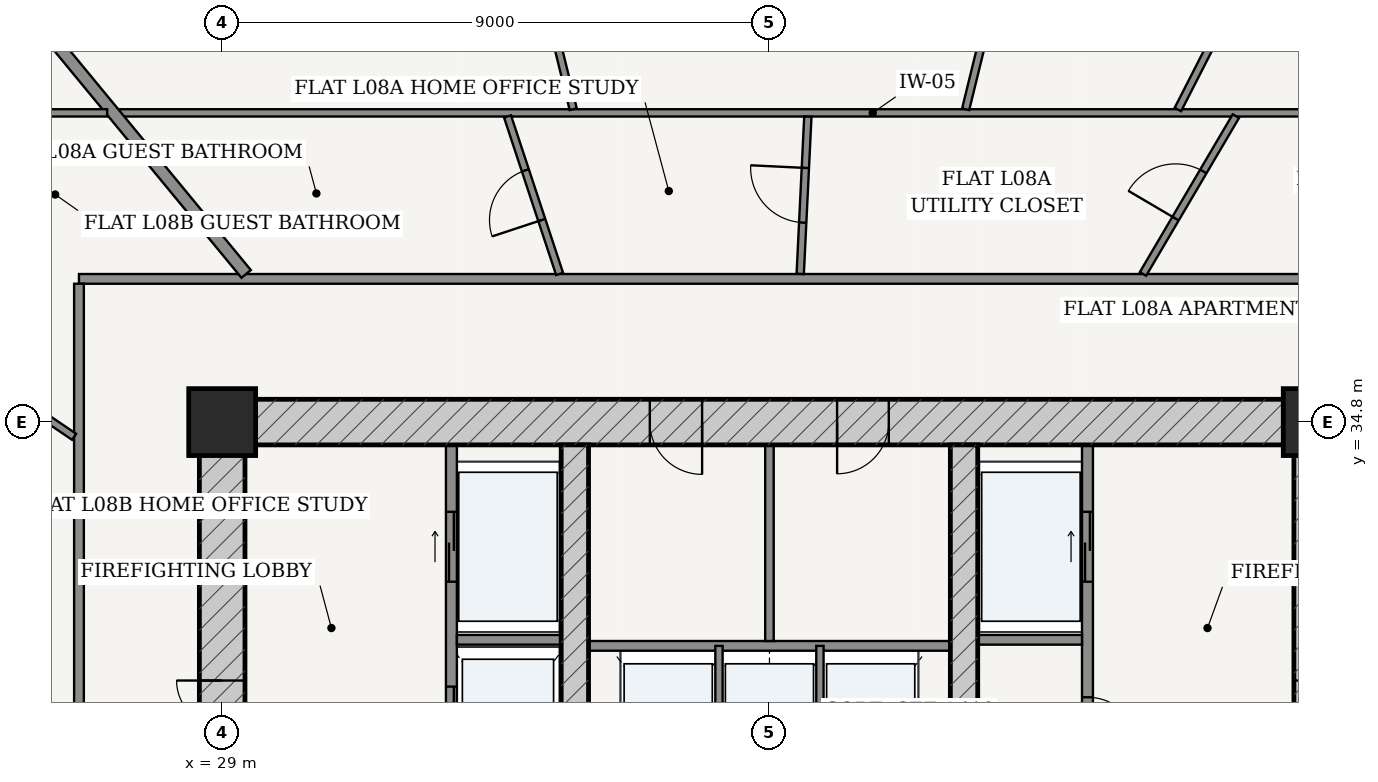
"""IFC4 building model, lengths in metres.
Left out: names, types, materials, properties, quantities, classifications, styles, units other than length and angle.
Written with IfcOpenShell. Run it as: python <this file> out.ifc"""

import sys

from ifc_helpers import new_model, si_unit, direction, frame, frame_2d, origin, origin_2d, place, context, subcontext, project, spatial, rectangle, extrude, source, transform, mapped, element, fill, save


model = new_model("IFC4")
c1 = context("Model", 3, precision=1e-05, world=origin(), true_north=direction((-0.2419218956, 0.970295726276)))
c2 = subcontext(c1, "Body", "Model", "MODEL_VIEW")
j1 = project(units=[si_unit("LENGTHUNIT", "METRE"), si_unit("PLANEANGLEUNIT", "RADIAN")], contexts=[c1])
p1 = place(None, origin())
s1 = spatial("IfcSite", under=j1, at=p1, CompositionType="ELEMENT")
p2 = place(p1, origin())
s2 = spatial("IfcBuilding", under=s1, at=p2, CompositionType="ELEMENT")
p3 = place(p2, frame((0.0, 0.0, 34.8)))
s3 = spatial("IfcBuildingStorey", under=s2, at=p3, CompositionType="ELEMENT", Elevation=34.8)
for number, where, z_axis, x_axis in (
    (1, (47.0, 34.8, 0.0), (0.0, 0.0, 1.0), (1.0, 0.0, 0.0)),
    (2, (29.0, 34.8, 0.0), (0.0, 0.0, 1.0), (1.0, 0.0, 0.0)),
):
    element("IfcColumn", number, at=place(p3, frame(where, z_axis=z_axis, x_axis=x_axis)), inside=s3, PredefinedType="COLUMN", context=c2, shape_type="SweptSolid", body=[
        extrude(rectangle(XDim=1.1, YDim=1.1, at=origin_2d()), origin(), (0.0, 0.0, 1.0), 3.6),
    ])
p4 = place(p3, frame((28.625, 34.8, 0.0), z_axis=(0.0, 0.0, 1.0), x_axis=(1.0, 0.0, 0.0)))
e3 = element("IfcWall", 3, at=p4, inside=s3, PredefinedType="SHEAR", context=c2, shape_type="SweptSolid", body=[
    extrude(rectangle(XDim=18.75, YDim=0.75, at=frame_2d((9.375, 0.0))), origin(), (0.0, 0.0, 1.0), 3.32),
])
p5 = place(p4, frame((7.407, 0.0, 0.0)))
e4 = element("IfcOpeningElement", 4, at=p5, cuts=e3, PredefinedType="OPENING", context=c2, shape_type="SweptSolid", body=[
    extrude(rectangle(XDim=0.86, YDim=2.1, at=frame_2d((0.43, 1.05))), frame((0.0, 0.385, 0.0), z_axis=(0.0, -1.0, 0.0), x_axis=(1.0, 0.0, 0.0)), (0.0, 0.0, 1.0), 0.77),
])
p6 = place(p4, frame((10.488, 0.0, 0.0)))
e5 = element("IfcOpeningElement", 5, at=p6, cuts=e3, PredefinedType="OPENING", context=c2, shape_type="SweptSolid", body=[
    extrude(rectangle(XDim=0.85, YDim=2.1, at=frame_2d((0.425, 1.05))), frame((0.0, 0.385, 0.0), z_axis=(0.0, -1.0, 0.0), x_axis=(1.0, 0.0, 0.0)), (0.0, 0.0, 1.0), 0.77),
])
p7 = place(p3, frame((29.0, 19.175, 0.0), z_axis=(0.0, 0.0, 1.0), x_axis=(0.0, 1.0, 0.0)))
e6 = element("IfcWall", 6, at=p7, inside=s3, PredefinedType="SHEAR", context=c2, shape_type="SweptSolid", body=[
    extrude(rectangle(XDim=15.25, YDim=0.75, at=frame_2d((7.625, 0.0))), origin(), (0.0, 0.0, 1.0), 3.32),
])
p8 = place(p7, frame((9.875, 0.0, 0.0)))
e7 = element("IfcOpeningElement", 7, at=p8, cuts=e6, PredefinedType="OPENING", context=c2, shape_type="SweptSolid", body=[
    extrude(rectangle(XDim=1.5, YDim=2.2, at=frame_2d((0.75, 1.1))), frame((0.0, 0.385, 0.0), z_axis=(0.0, -1.0, 0.0), x_axis=(1.0, 0.0, 0.0)), (0.0, 0.0, 1.0), 0.77),
])
p9 = place(p3, frame((47.0, 19.175, 0.0), z_axis=(0.0, 0.0, 1.0), x_axis=(0.0, 1.0, 0.0)))
e8 = element("IfcWall", 8, at=p9, inside=s3, PredefinedType="SHEAR", context=c2, shape_type="SweptSolid", body=[
    extrude(rectangle(XDim=15.25, YDim=0.75, at=frame_2d((7.625, 0.0))), origin(), (0.0, 0.0, 1.0), 3.32),
])
p10 = place(p9, frame((9.875, 0.0, 0.0)))
e9 = element("IfcOpeningElement", 9, at=p10, cuts=e8, PredefinedType="OPENING", context=c2, shape_type="SweptSolid", body=[
    extrude(rectangle(XDim=1.5, YDim=2.2, at=frame_2d((0.75, 1.1))), frame((0.0, 0.385, 0.0), z_axis=(0.0, -1.0, 0.0), x_axis=(1.0, 0.0, 0.0)), (0.0, 0.0, 1.0), 0.77),
])
p11 = place(p3, frame((34.8, 19.175, 0.0), z_axis=(0.0, 0.0, 1.0), x_axis=(0.0, 1.0, 0.0)))
e10 = element("IfcWall", 10, at=p11, inside=s3, PredefinedType="SHEAR", context=c2, shape_type="SweptSolid", body=[
    extrude(rectangle(XDim=15.25, YDim=0.45, at=frame_2d((7.625, 0.0))), origin(), (0.0, 0.0, 1.0), 3.32),
])
p12 = place(p11, frame((7.8, 0.0, 0.0)))
e11 = element("IfcOpeningElement", 11, at=p12, cuts=e10, PredefinedType="OPENING", context=c2, shape_type="SweptSolid", body=[
    extrude(rectangle(XDim=1.05, YDim=2.15, at=frame_2d((0.525, 1.075))), frame((0.0, 0.235, 0.0), z_axis=(0.0, -1.0, 0.0), x_axis=(1.0, 0.0, 0.0)), (0.0, 0.0, 1.0), 0.47),
])
p13 = place(p3, frame((41.2, 19.175, 0.0), z_axis=(0.0, 0.0, 1.0), x_axis=(0.0, 1.0, 0.0)))
e12 = element("IfcWall", 12, at=p13, inside=s3, PredefinedType="SHEAR", context=c2, shape_type="SweptSolid", body=[
    extrude(rectangle(XDim=15.25, YDim=0.45, at=frame_2d((7.625, 0.0))), origin(), (0.0, 0.0, 1.0), 3.32),
])
p14 = place(p13, frame((7.8, 0.0, 0.0)))
e13 = element("IfcOpeningElement", 13, at=p14, cuts=e12, PredefinedType="OPENING", context=c2, shape_type="SweptSolid", body=[
    extrude(rectangle(XDim=1.05, YDim=2.15, at=frame_2d((0.525, 1.075))), frame((0.0, 0.235, 0.0), z_axis=(0.0, -1.0, 0.0), x_axis=(1.0, 0.0, 0.0)), (0.0, 0.0, 1.0), 0.47),
])
p15 = place(p3, frame((32.77, 28.52, 0.0), z_axis=(0.0, 0.0, 1.0), x_axis=(0.0, 1.0, 0.0)))
e14 = element("IfcWall", 14, at=p15, inside=s3, PredefinedType="PARTITIONING", context=c2, shape_type="SweptSolid", body=[
    extrude(rectangle(XDim=5.905, YDim=0.18, at=frame_2d((2.953, 0.0))), origin(), (0.0, 0.0, 1.0), 3.32),
])
p16 = place(p15, frame((3.655, 0.0, 0.0)))
e15 = element("IfcOpeningElement", 15, at=p16, cuts=e14, PredefinedType="OPENING", context=c2, shape_type="SweptSolid", body=[
    extrude(rectangle(XDim=1.15, YDim=2.2, at=frame_2d((0.575, 1.1))), frame((0.0, 0.1, 0.0), z_axis=(0.0, -1.0, 0.0), x_axis=(1.0, 0.0, 0.0)), (0.0, 0.0, 1.0), 0.2),
])
p17 = place(p15, frame((0.73, 0.0, 0.0)))
e16 = element("IfcOpeningElement", 16, at=p17, cuts=e14, PredefinedType="OPENING", context=c2, shape_type="SweptSolid", body=[
    extrude(rectangle(XDim=1.2, YDim=2.25, at=frame_2d((0.6, 1.125))), frame((0.0, 0.1, 0.0), z_axis=(0.0, -1.0, 0.0), x_axis=(1.0, 0.0, 0.0)), (0.0, 0.0, 1.0), 0.2),
])
p18 = place(p3, frame((32.86, 31.22, 0.0), z_axis=(0.0, 0.0, 1.0), x_axis=(1.0, 0.0, 0.0)))
e17 = element("IfcWall", 17, at=p18, inside=s3, PredefinedType="PARTITIONING", context=c2, shape_type="SweptSolid", body=[
    extrude(rectangle(XDim=1.715, YDim=0.16, at=frame_2d((0.857, 0.0))), origin(), (0.0, 0.0, 1.0), 3.32),
])
p19 = place(p3, frame((43.23, 28.52, 0.0), z_axis=(0.0, 0.0, 1.0), x_axis=(0.0, 1.0, 0.0)))
e18 = element("IfcWall", 18, at=p19, inside=s3, PredefinedType="PARTITIONING", context=c2, shape_type="SweptSolid", body=[
    extrude(rectangle(XDim=5.905, YDim=0.18, at=frame_2d((2.953, 0.0))), origin(), (0.0, 0.0, 1.0), 3.32),
])
p20 = place(p19, frame((0.905, 0.0, 0.0)))
e19 = element("IfcOpeningElement", 19, at=p20, cuts=e18, PredefinedType="OPENING", context=c2, shape_type="SweptSolid", body=[
    extrude(rectangle(XDim=0.85, YDim=2.1, at=frame_2d((0.425, 1.05))), frame((0.0, 0.1, 0.0), z_axis=(0.0, -1.0, 0.0), x_axis=(1.0, 0.0, 0.0)), (0.0, 0.0, 1.0), 0.2),
])
p21 = place(p19, frame((3.655, 0.0, 0.0)))
e20 = element("IfcOpeningElement", 20, at=p21, cuts=e18, PredefinedType="OPENING", context=c2, shape_type="SweptSolid", body=[
    extrude(rectangle(XDim=1.15, YDim=2.2, at=frame_2d((0.575, 1.1))), frame((0.0, 0.1, 0.0), z_axis=(0.0, -1.0, 0.0), x_axis=(1.0, 0.0, 0.0)), (0.0, 0.0, 1.0), 0.2),
])
p22 = place(p3, frame((41.425, 31.22, 0.0), z_axis=(0.0, 0.0, 1.0), x_axis=(1.0, 0.0, 0.0)))
e21 = element("IfcWall", 21, at=p22, inside=s3, PredefinedType="PARTITIONING", context=c2, shape_type="SweptSolid", body=[
    extrude(rectangle(XDim=1.715, YDim=0.16, at=frame_2d((0.857, 0.0))), origin(), (0.0, 0.0, 1.0), 3.32),
])
p23 = place(p3, frame((35.025, 31.12, 0.0), z_axis=(0.0, 0.0, 1.0), x_axis=(1.0, 0.0, 0.0)))
e22 = element("IfcWall", 22, at=p23, inside=s3, PredefinedType="PARTITIONING", context=c2, shape_type="SweptSolid", body=[
    extrude(rectangle(XDim=5.95, YDim=0.16, at=frame_2d((2.975, 0.0))), origin(), (0.0, 0.0, 1.0), 3.32),
])
for number, where, z_axis, x_axis in (
    (23, (37.17, 28.56, 0.0), (0.0, 0.0, 1.0), (0.0, 1.0, 0.0)),
    (24, (38.83, 28.56, 0.0), (0.0, 0.0, 1.0), (0.0, 1.0, 0.0)),
):
    element("IfcWall", number, at=place(p3, frame(where, z_axis=z_axis, x_axis=x_axis)), inside=s3, PredefinedType="PARTITIONING", context=c2, shape_type="SweptSolid", body=[
        extrude(rectangle(XDim=2.56, YDim=0.12, at=frame_2d((1.28, 0.0))), origin(), (0.0, 0.0, 1.0), 3.32),
    ])
p24 = place(p3, frame((38.0, 31.2, 0.0), z_axis=(0.0, 0.0, 1.0), x_axis=(0.0, 1.0, 0.0)))
e25 = element("IfcWall", 25, at=p24, inside=s3, PredefinedType="PARTITIONING", context=c2, shape_type="SweptSolid", body=[
    extrude(rectangle(XDim=3.225, YDim=0.14, at=frame_2d((1.613, 0.0))), origin(), (0.0, 0.0, 1.0), 3.32),
])
p25 = place(p3, frame((26.645, 37.155, 0.0), z_axis=(0.0, 0.0, 1.0), x_axis=(1.0, 0.0, 0.0)))
e26 = element("IfcWall", 26, at=p25, inside=s3, PredefinedType="PARTITIONING", context=c2, shape_type="SweptSolid", body=[
    extrude(rectangle(XDim=22.71, YDim=0.16, at=frame_2d((11.355, 0.0))), origin(), (0.0, 0.0, 1.0), 2.688),
])
p26 = place(p3, frame((26.645, 16.525, 0.0), z_axis=(0.0, 0.0, 1.0), x_axis=(0.0, 1.0, 0.0)))
e27 = element("IfcWall", 27, at=p26, inside=s3, PredefinedType="PARTITIONING", context=c2, shape_type="SweptSolid", body=[
    extrude(rectangle(XDim=20.55, YDim=0.16, at=frame_2d((10.275, 0.0))), origin(), (0.0, 0.0, 1.0), 2.688),
])
p27 = place(p26, frame((1.226, 0.0, 0.0)))
e28 = element("IfcOpeningElement", 28, at=p27, cuts=e27, PredefinedType="OPENING", context=c2, shape_type="SweptSolid", body=[
    extrude(rectangle(XDim=0.98, YDim=2.2, at=frame_2d((0.49, 1.1))), frame((0.0, 0.09, 0.0), z_axis=(0.0, -1.0, 0.0), x_axis=(1.0, 0.0, 0.0)), (0.0, 0.0, 1.0), 0.18),
])
p28 = place(p3, frame((27.312, 39.885, 0.0), z_axis=(0.0, 0.0, 1.0), x_axis=(1.0, 0.0, 0.0)))
e29 = element("IfcWall", 29, at=p28, inside=s3, PredefinedType="PARTITIONING", context=c2, shape_type="SweptSolid", body=[
    extrude(rectangle(XDim=24.772, YDim=0.12, at=frame_2d((12.386, 0.0))), origin(), (0.0, 0.0, 1.0), 2.688),
])
p29 = place(p3, frame((44.717, 39.94, 0.0), z_axis=(0.0, 0.0, 1.0), x_axis=(0.455131303234, 0.890424335256, 0.0)))
e30 = element("IfcWall", 30, at=p29, inside=s3, PredefinedType="PARTITIONING", context=c2, shape_type="SweptSolid", body=[
    extrude(rectangle(XDim=9.562, YDim=0.12, at=frame_2d((4.781, 0.0))), origin(), (0.0, 0.0, 1.0), 2.762),
])
p30 = place(p29, frame((4.331, 0.0, 0.0)))
e31 = element("IfcOpeningElement", 31, at=p30, cuts=e30, PredefinedType="OPENING", context=c2, shape_type="SweptSolid", body=[
    extrude(rectangle(XDim=0.9, YDim=2.15, at=frame_2d((0.45, 1.075))), frame((0.0, 0.07, 0.0), z_axis=(0.0, -1.0, 0.0), x_axis=(1.0, 0.0, 0.0)), (0.0, 0.0, 1.0), 0.14),
])
p31 = place(p3, frame((41.227, 39.945, 0.0), z_axis=(0.0, 0.0, 1.0), x_axis=(0.238375747469, 0.97117300365, 0.0)))
e32 = element("IfcWall", 32, at=p31, inside=s3, PredefinedType="PARTITIONING", context=c2, shape_type="SweptSolid", body=[
    extrude(rectangle(XDim=10.086, YDim=0.12, at=frame_2d((5.043, 0.0))), origin(), (0.0, 0.0, 1.0), 2.688),
])
p32 = place(p31, frame((3.519, 0.0, 0.0)))
e33 = element("IfcOpeningElement", 33, at=p32, cuts=e32, PredefinedType="OPENING", context=c2, shape_type="SweptSolid", body=[
    extrude(rectangle(XDim=0.9, YDim=2.15, at=frame_2d((0.45, 1.075))), frame((0.0, 0.07, 0.0), z_axis=(0.0, -1.0, 0.0), x_axis=(1.0, 0.0, 0.0)), (0.0, 0.0, 1.0), 0.14),
])
p33 = place(p3, frame((34.773, 39.945, 0.0), z_axis=(0.0, 0.0, 1.0), x_axis=(-0.238375747469, 0.97117300365, 0.0)))
e34 = element("IfcWall", 34, at=p33, inside=s3, PredefinedType="PARTITIONING", context=c2, shape_type="SweptSolid", body=[
    extrude(rectangle(XDim=10.086, YDim=0.12, at=frame_2d((5.043, 0.0))), origin(), (0.0, 0.0, 1.0), 2.688),
])
p34 = place(p33, frame((3.518, 0.0, 0.0)))
e35 = element("IfcOpeningElement", 35, at=p34, cuts=e34, PredefinedType="OPENING", context=c2, shape_type="SweptSolid", body=[
    extrude(rectangle(XDim=0.9, YDim=2.15, at=frame_2d((0.45, 1.075))), frame((0.0, 0.07, 0.0), z_axis=(0.0, -1.0, 0.0), x_axis=(1.0, 0.0, 0.0)), (0.0, 0.0, 1.0), 0.14),
])
p35 = place(p3, frame((44.143, 37.237, 0.0), z_axis=(0.0, 0.0, 1.0), x_axis=(0.507275244465, 0.861784094976, 0.0)))
e36 = element("IfcWall", 36, at=p35, inside=s3, PredefinedType="PARTITIONING", context=c2, shape_type="SweptSolid", body=[
    extrude(rectangle(XDim=3.011, YDim=0.12, at=frame_2d((1.505, 0.0))), origin(), (0.0, 0.0, 1.0), 3.32),
])
p36 = place(p35, frame((1.055, 0.0, 0.0)))
e37 = element("IfcOpeningElement", 37, at=p36, cuts=e36, PredefinedType="OPENING", context=c2, shape_type="SweptSolid", body=[
    extrude(rectangle(XDim=0.9, YDim=2.15, at=frame_2d((0.45, 1.075))), frame((0.0, 0.07, 0.0), z_axis=(0.0, -1.0, 0.0), x_axis=(1.0, 0.0, 0.0)), (0.0, 0.0, 1.0), 0.14),
])
p37 = place(p3, frame((38.506, 37.237, 0.0), z_axis=(0.0, 0.0, 1.0), x_axis=(0.048376073987, 0.998829192338, 0.0)))
e38 = element("IfcWall", 38, at=p37, inside=s3, PredefinedType="PARTITIONING", context=c2, shape_type="SweptSolid", body=[
    extrude(rectangle(XDim=2.589, YDim=0.12, at=frame_2d((1.294, 0.0))), origin(), (0.0, 0.0, 1.0), 3.32),
])
p38 = place(p37, frame((0.844, 0.0, 0.0)))
e39 = element("IfcOpeningElement", 39, at=p38, cuts=e38, PredefinedType="OPENING", context=c2, shape_type="SweptSolid", body=[
    extrude(rectangle(XDim=0.9, YDim=2.15, at=frame_2d((0.45, 1.075))), frame((0.0, 0.07, 0.0), z_axis=(0.0, -1.0, 0.0), x_axis=(1.0, 0.0, 0.0)), (0.0, 0.0, 1.0), 0.14),
])
p39 = place(p3, frame((34.549, 37.237, 0.0), z_axis=(0.0, 0.0, 1.0), x_axis=(-0.313863409377, 0.949468145992, 0.0)))
e40 = element("IfcWall", 40, at=p39, inside=s3, PredefinedType="PARTITIONING", context=c2, shape_type="SweptSolid", body=[
    extrude(rectangle(XDim=2.727, YDim=0.12, at=frame_2d((1.364, 0.0))), origin(), (0.0, 0.0, 1.0), 3.32),
])
p40 = place(p39, frame((0.934, 0.0, 0.0)))
e41 = element("IfcOpeningElement", 41, at=p40, cuts=e40, PredefinedType="OPENING", context=c2, shape_type="SweptSolid", body=[
    extrude(rectangle(XDim=0.86, YDim=2.15, at=frame_2d((0.43, 1.075))), frame((0.0, 0.07, 0.0), z_axis=(0.0, -1.0, 0.0), x_axis=(1.0, 0.0, 0.0)), (0.0, 0.0, 1.0), 0.14),
])
p41 = place(p3, frame((29.395, 37.237, 0.0), z_axis=(0.0, 0.0, 1.0), x_axis=(-0.636195770442, 0.77152766747, 0.0)))
e42 = element("IfcWall", 42, at=p41, inside=s3, PredefinedType="PARTITIONING", context=c2, shape_type="SweptSolid", body=[
    extrude(rectangle(XDim=11.681, YDim=0.2, at=frame_2d((5.84, 0.0))), origin(), (0.0, 0.0, 1.0), 2.688),
])
p42 = place(p3, frame((23.915, 39.885, 0.0), z_axis=(0.0, 0.0, 1.0), x_axis=(1.0, 0.0, 0.0)))
e43 = element("IfcWall", 43, at=p42, inside=s3, PredefinedType="PARTITIONING", context=c2, shape_type="SweptSolid", body=[
    extrude(rectangle(XDim=3.194, YDim=0.12, at=frame_2d((1.597, 0.0))), origin(), (0.0, 0.0, 1.0), 2.688),
])
p43 = place(p3, frame((26.565, 34.558, 0.0), z_axis=(0.0, 0.0, 1.0), x_axis=(-0.827501574847, 0.561463394734, 0.0)))
e44 = element("IfcWall", 44, at=p43, inside=s3, PredefinedType="PARTITIONING", context=c2, shape_type="SweptSolid", body=[
    extrude(rectangle(XDim=3.14, YDim=0.12, at=frame_2d((1.57, 0.0))), origin(), (0.0, 0.0, 1.0), 3.32),
])
p44 = place(p3, frame((26.565, 29.744, 0.0), z_axis=(0.0, 0.0, 1.0), x_axis=(-0.968421803088, 0.249317490972, 0.0)))
e45 = element("IfcWall", 45, at=p44, inside=s3, PredefinedType="PARTITIONING", context=c2, shape_type="SweptSolid", body=[
    extrude(rectangle(XDim=2.674, YDim=0.12, at=frame_2d((1.337, 0.0))), origin(), (0.0, 0.0, 1.0), 3.32),
])
p45 = place(p44, frame((0.887, 0.0, 0.0)))
e46 = element("IfcOpeningElement", 46, at=p45, cuts=e45, PredefinedType="OPENING", context=c2, shape_type="SweptSolid", body=[
    extrude(rectangle(XDim=0.9, YDim=2.15, at=frame_2d((0.45, 1.075))), frame((0.0, 0.07, 0.0), z_axis=(0.0, -1.0, 0.0), x_axis=(1.0, 0.0, 0.0)), (0.0, 0.0, 1.0), 0.14),
])
m1 = source(origin(), c2, "Body", "SweptSolid", [
    extrude(rectangle(XDim=1.5, YDim=2.2, at=frame_2d((0.75, 1.1))), frame((0.0, 0.025, 0.0), z_axis=(0.0, -1.0, 0.0), x_axis=(1.0, 0.0, 0.0)), (0.0, 0.0, 1.0), 0.05),
])
p46 = place(p8, origin())
e47 = element("IfcDoor", 47, at=p46, inside=s3, OperationType="DOUBLE_DOOR_SINGLE_SWING", PredefinedType="DOOR", context=c2, shape_type="MappedRepresentation", body=[
    mapped(m1, transform((0.0, 0.0, 0.0), scale=1.0)),
])
fill(e7, e47)
m2 = source(origin(), c2, "Body", "SweptSolid", [
    extrude(rectangle(XDim=0.85, YDim=2.1, at=frame_2d((0.425, 1.05))), frame((0.0, 0.025, 0.0), z_axis=(0.0, -1.0, 0.0), x_axis=(1.0, 0.0, 0.0)), (0.0, 0.0, 1.0), 0.05),
])
p47 = place(p20, frame((0.85, 0.0, 0.0), z_axis=(0.0, 0.0, 1.0), x_axis=(-1.0, 0.0, 0.0)))
e48 = element("IfcDoor", 48, at=p47, inside=s3, OperationType="SINGLE_SWING_RIGHT", PredefinedType="DOOR", context=c2, shape_type="MappedRepresentation", body=[
    mapped(m2, transform((0.0, 0.0, 0.0), scale=1.0)),
])
fill(e19, e48)
m3 = source(origin(), c2, "Body", "SweptSolid", [
    extrude(rectangle(XDim=0.86, YDim=2.1, at=frame_2d((0.43, 1.05))), frame((0.0, 0.025, 0.0), z_axis=(0.0, -1.0, 0.0), x_axis=(1.0, 0.0, 0.0)), (0.0, 0.0, 1.0), 0.05),
])
p48 = place(p5, frame((0.86, 0.0, 0.0), z_axis=(0.0, 0.0, 1.0), x_axis=(-1.0, 0.0, 0.0)))
e49 = element("IfcDoor", 49, at=p48, inside=s3, OperationType="SINGLE_SWING_LEFT", PredefinedType="DOOR", context=c2, shape_type="MappedRepresentation", body=[
    mapped(m3, transform((0.0, 0.0, 0.0), scale=1.0)),
])
fill(e4, e49)
p49 = place(p6, frame((0.85, 0.0, 0.0), z_axis=(0.0, 0.0, 1.0), x_axis=(-1.0, 0.0, 0.0)))
e50 = element("IfcDoor", 50, at=p49, inside=s3, OperationType="SINGLE_SWING_RIGHT", PredefinedType="DOOR", context=c2, shape_type="MappedRepresentation", body=[
    mapped(m2, transform((0.0, 0.0, 0.0), scale=1.0)),
])
fill(e5, e50)
m4 = source(origin(), c2, "Body", "SweptSolid", [
    extrude(rectangle(XDim=1.15, YDim=2.2, at=frame_2d((0.575, 1.1))), frame((0.0, 0.025, 0.0), z_axis=(0.0, -1.0, 0.0), x_axis=(1.0, 0.0, 0.0)), (0.0, 0.0, 1.0), 0.05),
])
p50 = place(p16, origin())
e51 = element("IfcDoor", 51, at=p50, inside=s3, OperationType="DOUBLE_DOOR_SLIDING", PredefinedType="DOOR", context=c2, shape_type="MappedRepresentation", body=[
    mapped(m4, transform((0.0, 0.0, 0.0), scale=1.0)),
])
fill(e15, e51)
p51 = place(p21, origin())
e52 = element("IfcDoor", 52, at=p51, inside=s3, OperationType="DOUBLE_DOOR_SLIDING", PredefinedType="DOOR", context=c2, shape_type="MappedRepresentation", body=[
    mapped(m4, transform((0.0, 0.0, 0.0), scale=1.0)),
])
fill(e20, e52)
m5 = source(origin(), c2, "Body", "SweptSolid", [
    extrude(rectangle(XDim=1.2, YDim=2.25, at=frame_2d((0.6, 1.125))), frame((0.0, 0.025, 0.0), z_axis=(0.0, -1.0, 0.0), x_axis=(1.0, 0.0, 0.0)), (0.0, 0.0, 1.0), 0.05),
])
p52 = place(p17, origin())
e53 = element("IfcDoor", 53, at=p52, inside=s3, OperationType="DOUBLE_DOOR_SLIDING", PredefinedType="DOOR", context=c2, shape_type="MappedRepresentation", body=[
    mapped(m5, transform((0.0, 0.0, 0.0), scale=1.0)),
])
fill(e16, e53)
m6 = source(origin(), c2, "Body", "SweptSolid", [
    extrude(rectangle(XDim=0.9, YDim=2.15, at=frame_2d((0.45, 1.075))), frame((0.0, 0.025, 0.0), z_axis=(0.0, -1.0, 0.0), x_axis=(1.0, 0.0, 0.0)), (0.0, 0.0, 1.0), 0.05),
])
p53 = place(p36, origin())
e54 = element("IfcDoor", 54, at=p53, inside=s3, OperationType="SINGLE_SWING_LEFT", PredefinedType="DOOR", context=c2, shape_type="MappedRepresentation", body=[
    mapped(m6, transform((0.0, 0.0, 0.0), scale=1.0)),
])
fill(e37, e54)
p54 = place(p38, origin())
e55 = element("IfcDoor", 55, at=p54, inside=s3, OperationType="SINGLE_SWING_RIGHT", PredefinedType="DOOR", context=c2, shape_type="MappedRepresentation", body=[
    mapped(m6, transform((0.0, 0.0, 0.0), scale=1.0)),
])
fill(e39, e55)
m7 = source(origin(), c2, "Body", "SweptSolid", [
    extrude(rectangle(XDim=0.86, YDim=2.15, at=frame_2d((0.43, 1.075))), frame((0.0, 0.025, 0.0), z_axis=(0.0, -1.0, 0.0), x_axis=(1.0, 0.0, 0.0)), (0.0, 0.0, 1.0), 0.05),
])
p55 = place(p40, origin())
e56 = element("IfcDoor", 56, at=p55, inside=s3, OperationType="SINGLE_SWING_LEFT", PredefinedType="DOOR", context=c2, shape_type="MappedRepresentation", body=[
    mapped(m7, transform((0.0, 0.0, 0.0), scale=1.0)),
])
fill(e41, e56)
save(model, sys.argv[1])
